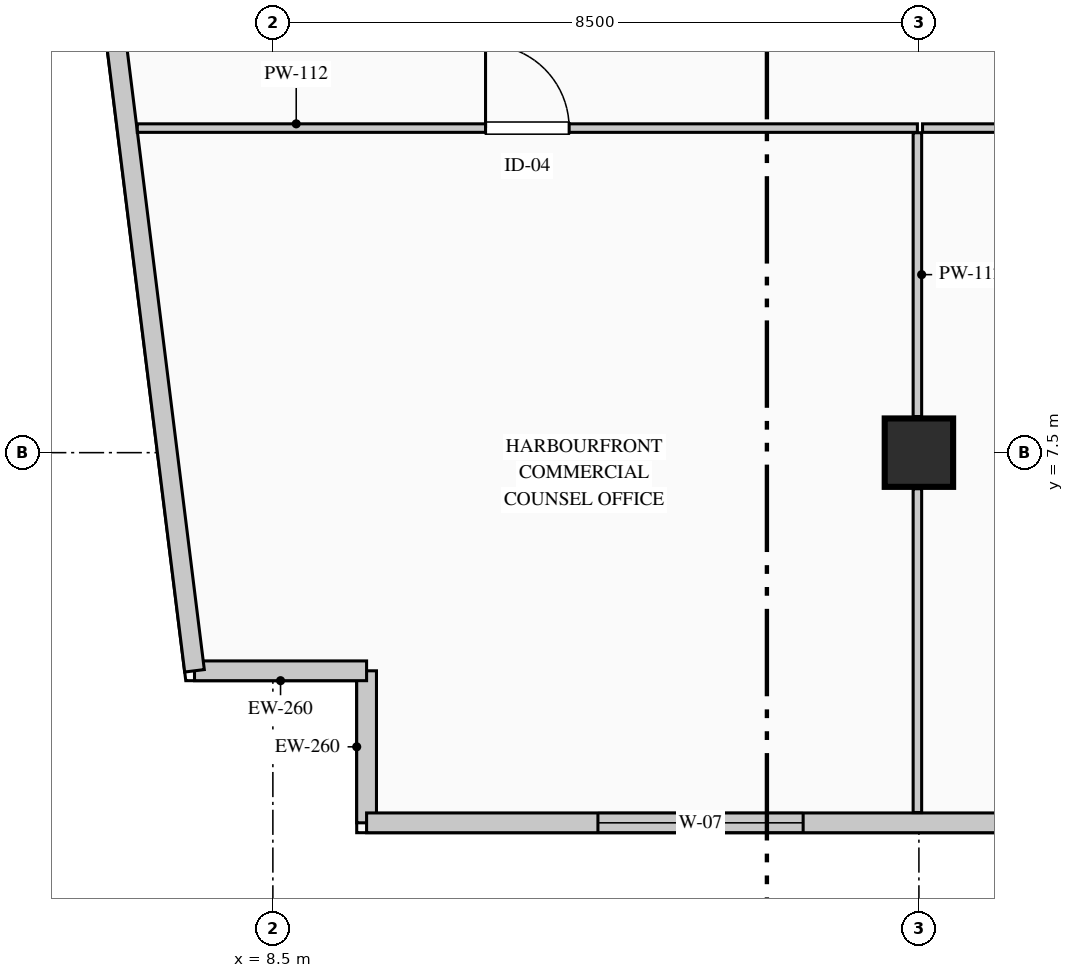
"""IFC4 building model, lengths in metres.
Left out: names, types, materials, properties, quantities, classifications, styles, units other than length and angle.
Written with IfcOpenShell. Run it as: python <this file> out.ifc"""

import sys

from ifc_helpers import new_model, si_unit, direction, frame, frame_2d, origin, origin_2d, place, context, subcontext, project, spatial, rectangle, extrude, element, fill, save


model = new_model("IFC4")
c1 = context("Model", 3, precision=1e-05, world=origin(), true_north=direction((0.0, 1.0)))
c2 = subcontext(c1, "Body", "Model", "MODEL_VIEW")
j1 = project(units=[si_unit("LENGTHUNIT", "METRE"), si_unit("PLANEANGLEUNIT", "RADIAN")], contexts=[c1])
p1 = place(None, origin())
s1 = spatial("IfcSite", under=j1, at=p1, CompositionType="ELEMENT")
p2 = place(p1, origin())
s2 = spatial("IfcBuilding", under=s1, at=p2, CompositionType="ELEMENT")
p3 = place(p2, frame((0.0, 0.0, 183.75)))
s3 = spatial("IfcBuildingStorey", under=s2, at=p3, CompositionType="ELEMENT", Elevation=183.75)
p4 = place(p3, frame((17.0, 7.5, 0.0), z_axis=(0.0, 0.0, 1.0), x_axis=(1.0, 0.0, 0.0)))
e1 = element("IfcColumn", 1, at=p4, inside=s3, PredefinedType="COLUMN", context=c2, shape_type="SweptSolid", body=[
    extrude(rectangle(XDim=0.9, YDim=0.9, at=origin_2d()), origin(), (0.0, 0.0, 1.0), 3.95),
])
p5 = place(p3, frame((9.733, 2.63, 0.0), z_axis=(0.0, 0.0, 1.0), x_axis=(0.0, 1.0, 0.0)))
e2 = element("IfcWall", 2, at=p5, inside=s3, PredefinedType="STANDARD", context=c2, shape_type="SweptSolid", body=[
    extrude(rectangle(XDim=2.0, YDim=0.26, at=frame_2d((1.0, 0.0))), origin(), (0.0, 0.0, 1.0), 3.7),
])
p6 = place(p3, frame((9.733, 4.63, 0.0), z_axis=(0.0, 0.0, 1.0), x_axis=(-1.0, 0.0, 0.0)))
e3 = element("IfcWall", 3, at=p6, inside=s3, PredefinedType="STANDARD", context=c2, shape_type="SweptSolid", body=[
    extrude(rectangle(XDim=2.264, YDim=0.26, at=frame_2d((1.132, 0.0))), origin(), (0.0, 0.0, 1.0), 3.7),
])
p7 = place(p3, frame((7.469, 4.63, 0.0), z_axis=(0.0, 0.0, 1.0), x_axis=(-0.123515300309, 0.992342667928, 0.0)))
e4 = element("IfcWall", 4, at=p7, inside=s3, PredefinedType="STANDARD", context=c2, shape_type="SweptSolid", body=[
    extrude(rectangle(XDim=37.024, YDim=0.26, at=frame_2d((18.512, 0.0))), origin(), (0.0, 0.0, 1.0), 3.7),
])
p8 = place(p7, frame((11.978, 0.0, 0.9)))
e5 = element("IfcOpeningElement", 5, at=p8, cuts=e4, PredefinedType="OPENING", context=c2, shape_type="SweptSolid", body=[
    extrude(rectangle(XDim=2.7, YDim=2.1, at=frame_2d((1.35, 1.05))), frame((0.0, 0.14, 0.0), z_axis=(0.0, -1.0, 0.0), x_axis=(1.0, 0.0, 0.0)), (0.0, 0.0, 1.0), 0.28),
])
p9 = place(p3, frame((21.937, 2.63, 0.0), z_axis=(0.0, 0.0, 1.0), x_axis=(-1.0, 0.0, 0.0)))
e6 = element("IfcWall", 6, at=p9, inside=s3, PredefinedType="STANDARD", context=c2, shape_type="SweptSolid", body=[
    extrude(rectangle(XDim=12.204, YDim=0.26, at=frame_2d((6.102, 0.0))), origin(), (0.0, 0.0, 1.0), 3.7),
])
p10 = place(p9, frame((6.46, 0.0, 0.9)))
e7 = element("IfcOpeningElement", 7, at=p10, cuts=e6, PredefinedType="OPENING", context=c2, shape_type="SweptSolid", body=[
    extrude(rectangle(XDim=2.7, YDim=2.1, at=frame_2d((1.35, 1.05))), frame((0.0, 0.14, 0.0), z_axis=(0.0, -1.0, 0.0), x_axis=(1.0, 0.0, 0.0)), (0.0, 0.0, 1.0), 0.28),
])
p11 = place(p3, frame((6.716, 11.77, 0.0), z_axis=(0.0, 0.0, 1.0), x_axis=(1.0, 0.0, 0.0)))
e8 = element("IfcWall", 8, at=p11, inside=s3, PredefinedType="PARTITIONING", context=c2, shape_type="SweptSolid", body=[
    extrude(rectangle(XDim=10.264, YDim=0.112, at=frame_2d((5.132, 0.0))), origin(), (0.0, 0.0, 1.0), 3.7),
])
p12 = place(p11, frame((4.582, 0.0, 0.0)))
e9 = element("IfcOpeningElement", 9, at=p12, cuts=e8, PredefinedType="OPENING", context=c2, shape_type="SweptSolid", body=[
    extrude(rectangle(XDim=1.1, YDim=2.2, at=frame_2d((0.55, 1.1))), frame((0.0, 0.066, 0.0), z_axis=(0.0, -1.0, 0.0), x_axis=(1.0, 0.0, 0.0)), (0.0, 0.0, 1.0), 0.132),
])
p13 = place(p3, frame((16.98, 11.709, 0.0), z_axis=(0.0, 0.0, 1.0), x_axis=(0.0, -1.0, 0.0)))
e10 = element("IfcWall", 10, at=p13, inside=s3, PredefinedType="PARTITIONING", context=c2, shape_type="SweptSolid", body=[
    extrude(rectangle(XDim=3.734, YDim=0.112, at=frame_2d((1.867, 0.0))), origin(), (0.0, 0.0, 1.0), 3.085),
])
p14 = place(p3, frame((16.98, 7.025, 0.0), z_axis=(0.0, 0.0, 1.0), x_axis=(0.0, -1.0, 0.0)))
e11 = element("IfcWall", 11, at=p14, inside=s3, PredefinedType="PARTITIONING", context=c2, shape_type="SweptSolid", body=[
    extrude(rectangle(XDim=4.26, YDim=0.112, at=frame_2d((2.13, 0.0))), origin(), (0.0, 0.0, 1.0), 3.7),
])
p15 = place(p3, frame((17.048, 11.77, 0.0), z_axis=(0.0, 0.0, 1.0), x_axis=(1.0, 0.0, 0.0)))
e12 = element("IfcWall", 12, at=p15, inside=s3, PredefinedType="PARTITIONING", context=c2, shape_type="SweptSolid", body=[
    extrude(rectangle(XDim=5.467, YDim=0.112, at=frame_2d((2.733, 0.0))), origin(), (0.0, 0.0, 1.0), 3.7),
])
p16 = place(p15, frame((1.523, 0.0, 0.0)))
e13 = element("IfcOpeningElement", 13, at=p16, cuts=e12, PredefinedType="OPENING", context=c2, shape_type="SweptSolid", body=[
    extrude(rectangle(XDim=1.1, YDim=2.2, at=frame_2d((0.55, 1.1))), frame((0.0, 0.066, 0.0), z_axis=(0.0, -1.0, 0.0), x_axis=(1.0, 0.0, 0.0)), (0.0, 0.0, 1.0), 0.132),
])
p17 = place(p10, origin())
e14 = element("IfcWindow", 14, at=p17, inside=s3, PartitioningType="DOUBLE_PANEL_VERTICAL", PredefinedType="WINDOW", context=c2, shape_type="SweptSolid", body=[
    extrude(rectangle(XDim=2.7, YDim=2.1, at=frame_2d((1.35, 1.05))), frame((0.0, 0.03, 0.0), z_axis=(0.0, -1.0, 0.0), x_axis=(1.0, 0.0, 0.0)), (0.0, 0.0, 1.0), 0.06),
])
fill(e7, e14)
p18 = place(p12, origin())
e15 = element("IfcDoor", 15, at=p18, inside=s3, OperationType="SINGLE_SWING_LEFT", PredefinedType="DOOR", context=c2, shape_type="SweptSolid", body=[
    extrude(rectangle(XDim=1.1, YDim=2.2, at=frame_2d((0.55, 1.1))), frame((0.0, 0.025, 0.0), z_axis=(0.0, -1.0, 0.0), x_axis=(1.0, 0.0, 0.0)), (0.0, 0.0, 1.0), 0.05),
])
fill(e9, e15)
save(model, sys.argv[1])
